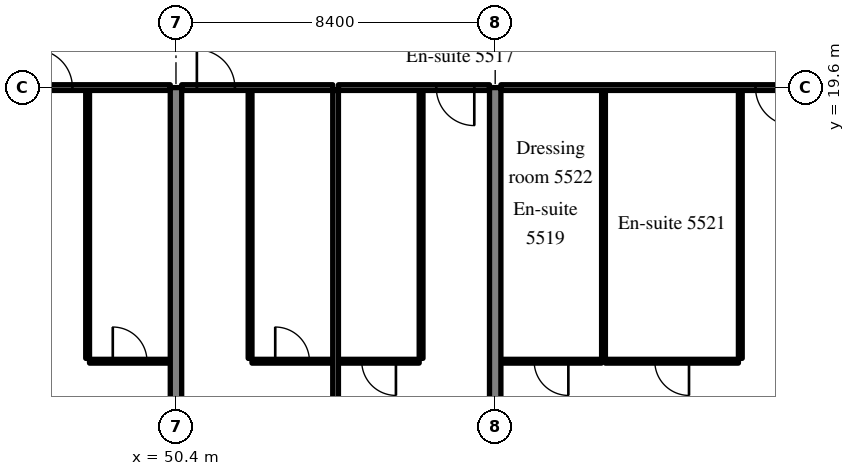
"""IFC4 building model, lengths in metres.
Left out: names, types, materials, properties, quantities, classifications, styles, units other than length and angle.
Written with IfcOpenShell. Run it as: python <this file> out.ifc"""

import sys

from ifc_helpers import new_model, si_unit, direction, frame, frame_2d, origin, place, context, subcontext, project, spatial, rectangle, extrude, source, transform, mapped, element, fill, save


model = new_model("IFC4")
c1 = context("Model", 3, precision=1e-05, world=origin(), true_north=direction((0.0, 1.0)))
c2 = subcontext(c1, "Body", "Model", "MODEL_VIEW")
j1 = project(units=[si_unit("LENGTHUNIT", "METRE"), si_unit("PLANEANGLEUNIT", "RADIAN")], contexts=[c1])
p1 = place(None, origin())
s1 = spatial("IfcSite", under=j1, at=p1, CompositionType="ELEMENT")
p2 = place(p1, origin())
s2 = spatial("IfcBuilding", under=s1, at=p2, CompositionType="ELEMENT")
p3 = place(p2, frame((0.0, 0.0, 229.6)))
s3 = spatial("IfcBuildingStorey", under=s2, at=p3, CompositionType="ELEMENT", Elevation=229.6)
m1 = source(origin(), c2, "Body", "SweptSolid", [
    extrude(rectangle(XDim=13.1, YDim=0.3, at=frame_2d((6.55, 0.0))), origin(), (0.0, 0.0, 1.0), 3.62),
])
p4 = place(p3, frame((50.4, 6.5, 0.0), z_axis=(0.0, 0.0, 1.0), x_axis=(0.0, 1.0, 0.0)))
e1 = element("IfcWall", 1, at=p4, inside=s3, PredefinedType="SHEAR", context=c2, shape_type="MappedRepresentation", body=[
    mapped(m1, transform((0.0, 0.0, 0.0), scale=1.0)),
])
m2 = source(origin(), c2, "Body", "SweptSolid", [
    extrude(rectangle(XDim=14.1, YDim=0.3, at=frame_2d((7.05, 0.0))), origin(), (0.0, 0.0, 1.0), 3.62),
])
p5 = place(p3, frame((58.8, 5.5, 0.0), z_axis=(0.0, 0.0, 1.0), x_axis=(0.0, 1.0, 0.0)))
e2 = element("IfcWall", 2, at=p5, inside=s3, PredefinedType="SHEAR", context=c2, shape_type="MappedRepresentation", body=[
    mapped(m2, transform((0.0, 0.0, 0.0), scale=1.0)),
])
m3 = source(origin(), c2, "Body", "SweptSolid", [
    extrude(rectangle(XDim=7.05, YDim=0.1, at=frame_2d((3.525, 0.0))), origin(), (0.0, 0.0, 1.0), 3.62),
])
p6 = place(p3, frame((48.075, 12.475, 0.0), z_axis=(0.0, 0.0, 1.0), x_axis=(0.0, 1.0, 0.0)))
e3 = element("IfcWall", 3, at=p6, inside=s3, PredefinedType="PARTITIONING", context=c2, shape_type="MappedRepresentation", body=[
    mapped(m3, transform((0.0, 0.0, 0.0), scale=1.0)),
])
m4 = source(origin(), c2, "Body", "SweptSolid", [
    extrude(rectangle(XDim=2.125, YDim=0.1, at=frame_2d((1.062, 0.0))), origin(), (0.0, 0.0, 1.0), 3.62),
])
p7 = place(p3, frame((48.125, 12.4, 0.0), z_axis=(0.0, 0.0, 1.0), x_axis=(1.0, 0.0, 0.0)))
e4 = element("IfcWall", 4, at=p7, inside=s3, PredefinedType="PARTITIONING", context=c2, shape_type="MappedRepresentation", body=[
    mapped(m4, transform((0.0, 0.0, 0.0), scale=1.0)),
])
m5 = source(origin(), c2, "Body", "SweptSolid", [
    extrude(rectangle(XDim=0.9, YDim=2.1, at=frame_2d((0.45, 1.05))), frame((0.0, 0.06, 0.0), z_axis=(0.0, -1.0, 0.0), x_axis=(1.0, 0.0, 0.0)), (0.0, 0.0, 1.0), 0.12),
])
p8 = place(p7, frame((0.612, 0.0, 0.0)))
e5 = element("IfcOpeningElement", 5, at=p8, cuts=e4, PredefinedType="OPENING", context=c2, shape_type="MappedRepresentation", body=[
    mapped(m5, transform((0.0, 0.0, 0.0), scale=1.0)),
])
m6 = source(origin(), c2, "Body", "SweptSolid", [
    extrude(rectangle(XDim=3.975, YDim=0.15, at=frame_2d((1.988, 0.0))), origin(), (0.0, 0.0, 1.0), 2.92),
])
p9 = place(p3, frame((46.275, 19.6, 0.0), z_axis=(0.0, 0.0, 1.0), x_axis=(1.0, 0.0, 0.0)))
e6 = element("IfcWall", 6, at=p9, inside=s3, PredefinedType="PARTITIONING", context=c2, shape_type="MappedRepresentation", body=[
    mapped(m6, transform((0.0, 0.0, 0.0), scale=1.0)),
])
m7 = source(origin(), c2, "Body", "SweptSolid", [
    extrude(rectangle(XDim=1.0, YDim=2.1, at=frame_2d((0.5, 1.05))), frame((0.0, 0.085, 0.0), z_axis=(0.0, -1.0, 0.0), x_axis=(1.0, 0.0, 0.0)), (0.0, 0.0, 1.0), 0.17),
])
p10 = place(p9, frame((0.4, 0.0, 0.0)))
e7 = element("IfcOpeningElement", 7, at=p10, cuts=e6, PredefinedType="OPENING", context=c2, shape_type="MappedRepresentation", body=[
    mapped(m7, transform((0.0, 0.0, 0.0), scale=1.0)),
])
p11 = place(p3, frame((52.35, 12.475, 0.0), z_axis=(0.0, 0.0, 1.0), x_axis=(0.0, 1.0, 0.0)))
e8 = element("IfcWall", 8, at=p11, inside=s3, PredefinedType="PARTITIONING", context=c2, shape_type="MappedRepresentation", body=[
    mapped(m3, transform((0.0, 0.0, 0.0), scale=1.0)),
])
p12 = place(p3, frame((52.4, 12.4, 0.0), z_axis=(0.0, 0.0, 1.0), x_axis=(1.0, 0.0, 0.0)))
e9 = element("IfcWall", 9, at=p12, inside=s3, PredefinedType="PARTITIONING", context=c2, shape_type="MappedRepresentation", body=[
    mapped(m4, transform((0.0, 0.0, 0.0), scale=1.0)),
])
p13 = place(p12, frame((0.612, 0.0, 0.0)))
e10 = element("IfcOpeningElement", 10, at=p13, cuts=e9, PredefinedType="OPENING", context=c2, shape_type="MappedRepresentation", body=[
    mapped(m5, transform((0.0, 0.0, 0.0), scale=1.0)),
])
m8 = source(origin(), c2, "Body", "SweptSolid", [
    extrude(rectangle(XDim=3.975, YDim=0.15, at=frame_2d((1.987, 0.0))), origin(), (0.0, 0.0, 1.0), 2.92),
])
p14 = place(p3, frame((50.55, 19.6, 0.0), z_axis=(0.0, 0.0, 1.0), x_axis=(1.0, 0.0, 0.0)))
e11 = element("IfcWall", 11, at=p14, inside=s3, PredefinedType="PARTITIONING", context=c2, shape_type="MappedRepresentation", body=[
    mapped(m8, transform((0.0, 0.0, 0.0), scale=1.0)),
])
p15 = place(p14, frame((0.4, 0.0, 0.0)))
e12 = element("IfcOpeningElement", 12, at=p15, cuts=e11, PredefinedType="OPENING", context=c2, shape_type="MappedRepresentation", body=[
    mapped(m7, transform((0.0, 0.0, 0.0), scale=1.0)),
])
p16 = place(p3, frame((56.85, 12.475, 0.0), z_axis=(0.0, 0.0, 1.0), x_axis=(0.0, 1.0, 0.0)))
e13 = element("IfcWall", 13, at=p16, inside=s3, PredefinedType="PARTITIONING", context=c2, shape_type="MappedRepresentation", body=[
    mapped(m3, transform((0.0, 0.0, 0.0), scale=1.0)),
])
p17 = place(p3, frame((54.675, 12.4, 0.0), z_axis=(0.0, 0.0, 1.0), x_axis=(1.0, 0.0, 0.0)))
e14 = element("IfcWall", 14, at=p17, inside=s3, PredefinedType="PARTITIONING", context=c2, shape_type="MappedRepresentation", body=[
    mapped(m4, transform((0.0, 0.0, 0.0), scale=1.0)),
])
p18 = place(p17, frame((0.613, 0.0, 0.0)))
e15 = element("IfcOpeningElement", 15, at=p18, cuts=e14, PredefinedType="OPENING", context=c2, shape_type="MappedRepresentation", body=[
    mapped(m5, transform((0.0, 0.0, 0.0), scale=1.0)),
])
p19 = place(p3, frame((54.675, 19.6, 0.0), z_axis=(0.0, 0.0, 1.0), x_axis=(1.0, 0.0, 0.0)))
e16 = element("IfcWall", 16, at=p19, inside=s3, PredefinedType="PARTITIONING", context=c2, shape_type="MappedRepresentation", body=[
    mapped(m8, transform((0.0, 0.0, 0.0), scale=1.0)),
])
p20 = place(p19, frame((2.575, 0.0, 0.0)))
e17 = element("IfcOpeningElement", 17, at=p20, cuts=e16, PredefinedType="OPENING", context=c2, shape_type="MappedRepresentation", body=[
    mapped(m7, transform((0.0, 0.0, 0.0), scale=1.0)),
])
m9 = source(origin(), c2, "Body", "SweptSolid", [
    extrude(rectangle(XDim=14.906, YDim=0.15, at=frame_2d((7.453, 0.0))), origin(), (0.0, 0.0, 1.0), 3.62),
])
p21 = place(p3, frame((54.6, 4.619, 0.0), z_axis=(0.0, 0.0, 1.0), x_axis=(0.0, 1.0, 0.0)))
e18 = element("IfcWall", 18, at=p21, inside=s3, PredefinedType="PARTITIONING", context=c2, shape_type="MappedRepresentation", body=[
    mapped(m9, transform((0.0, 0.0, 0.0), scale=1.0)),
])
for number, where, z_axis, x_axis in (
    (19, (65.25, 12.475, 0.0), (0.0, 0.0, 1.0), (0.0, 1.0, 0.0)),
    (20, (61.65, 12.475, 0.0), (0.0, 0.0, 1.0), (0.0, 1.0, 0.0)),
):
    element("IfcWall", number, at=place(p3, frame(where, z_axis=z_axis, x_axis=x_axis)), inside=s3, PredefinedType="PARTITIONING", context=c2, shape_type="MappedRepresentation", body=[
        mapped(m3, transform((0.0, 0.0, 0.0), scale=1.0)),
    ])
m10 = source(origin(), c2, "Body", "SweptSolid", [
    extrude(rectangle(XDim=3.5, YDim=0.1, at=frame_2d((1.75, 0.0))), origin(), (0.0, 0.0, 1.0), 3.62),
])
p22 = place(p3, frame((61.7, 12.4, 0.0), z_axis=(0.0, 0.0, 1.0), x_axis=(1.0, 0.0, 0.0)))
e21 = element("IfcWall", 21, at=p22, inside=s3, PredefinedType="PARTITIONING", context=c2, shape_type="MappedRepresentation", body=[
    mapped(m10, transform((0.0, 0.0, 0.0), scale=1.0)),
])
p23 = place(p22, frame((1.3, 0.0, 0.0)))
e22 = element("IfcOpeningElement", 22, at=p23, cuts=e21, PredefinedType="OPENING", context=c2, shape_type="MappedRepresentation", body=[
    mapped(m5, transform((0.0, 0.0, 0.0), scale=1.0)),
])
m11 = source(origin(), c2, "Body", "SweptSolid", [
    extrude(rectangle(XDim=2.65, YDim=0.1, at=frame_2d((1.325, 0.0))), origin(), (0.0, 0.0, 1.0), 3.62),
])
p24 = place(p3, frame((58.95, 12.4, 0.0), z_axis=(0.0, 0.0, 1.0), x_axis=(1.0, 0.0, 0.0)))
e23 = element("IfcWall", 23, at=p24, inside=s3, PredefinedType="PARTITIONING", context=c2, shape_type="MappedRepresentation", body=[
    mapped(m11, transform((0.0, 0.0, 0.0), scale=1.0)),
])
p25 = place(p24, frame((0.875, 0.0, 0.0)))
e24 = element("IfcOpeningElement", 24, at=p25, cuts=e23, PredefinedType="OPENING", context=c2, shape_type="MappedRepresentation", body=[
    mapped(m5, transform((0.0, 0.0, 0.0), scale=1.0)),
])
m12 = source(origin(), c2, "Body", "SweptSolid", [
    extrude(rectangle(XDim=8.1, YDim=0.15, at=frame_2d((4.05, 0.0))), origin(), (0.0, 0.0, 1.0), 2.92),
])
p26 = place(p3, frame((58.95, 19.6, 0.0), z_axis=(0.0, 0.0, 1.0), x_axis=(1.0, 0.0, 0.0)))
e25 = element("IfcWall", 25, at=p26, inside=s3, PredefinedType="PARTITIONING", context=c2, shape_type="MappedRepresentation", body=[
    mapped(m12, transform((0.0, 0.0, 0.0), scale=1.0)),
])
p27 = place(p26, frame((6.7, 0.0, 0.0)))
e26 = element("IfcOpeningElement", 26, at=p27, cuts=e25, PredefinedType="OPENING", context=c2, shape_type="MappedRepresentation", body=[
    mapped(m7, transform((0.0, 0.0, 0.0), scale=1.0)),
])
m13 = source(origin(), c2, "Body", "SweptSolid", [
    extrude(rectangle(XDim=0.9, YDim=2.1, at=frame_2d((0.45, 1.05))), frame((0.0, 0.025, 0.0), z_axis=(0.0, -1.0, 0.0), x_axis=(1.0, 0.0, 0.0)), (0.0, 0.0, 1.0), 0.05),
])
p28 = place(p8, origin())
e27 = element("IfcDoor", 27, at=p28, inside=s3, OperationType="SINGLE_SWING_LEFT", PredefinedType="DOOR", context=c2, shape_type="MappedRepresentation", body=[
    mapped(m13, transform((0.0, 0.0, 0.0), scale=1.0)),
])
fill(e5, e27)
m14 = source(origin(), c2, "Body", "SweptSolid", [
    extrude(rectangle(XDim=1.0, YDim=2.1, at=frame_2d((0.5, 1.05))), frame((0.0, 0.025, 0.0), z_axis=(0.0, -1.0, 0.0), x_axis=(1.0, 0.0, 0.0)), (0.0, 0.0, 1.0), 0.05),
])
p29 = place(p10, origin())
e28 = element("IfcDoor", 28, at=p29, inside=s3, OperationType="SINGLE_SWING_LEFT", PredefinedType="DOOR", context=c2, shape_type="MappedRepresentation", body=[
    mapped(m14, transform((0.0, 0.0, 0.0), scale=1.0)),
])
fill(e7, e28)
p30 = place(p13, origin())
e29 = element("IfcDoor", 29, at=p30, inside=s3, OperationType="SINGLE_SWING_LEFT", PredefinedType="DOOR", context=c2, shape_type="MappedRepresentation", body=[
    mapped(m13, transform((0.0, 0.0, 0.0), scale=1.0)),
])
fill(e10, e29)
p31 = place(p15, origin())
e30 = element("IfcDoor", 30, at=p31, inside=s3, OperationType="SINGLE_SWING_LEFT", PredefinedType="DOOR", context=c2, shape_type="MappedRepresentation", body=[
    mapped(m14, transform((0.0, 0.0, 0.0), scale=1.0)),
])
fill(e12, e30)
p32 = place(p18, origin())
e31 = element("IfcDoor", 31, at=p32, inside=s3, OperationType="SINGLE_SWING_RIGHT", PredefinedType="DOOR", context=c2, shape_type="MappedRepresentation", body=[
    mapped(m13, transform((0.0, 0.0, 0.0), scale=1.0)),
])
fill(e15, e31)
p33 = place(p20, origin())
e32 = element("IfcDoor", 32, at=p33, inside=s3, OperationType="SINGLE_SWING_RIGHT", PredefinedType="DOOR", context=c2, shape_type="MappedRepresentation", body=[
    mapped(m14, transform((0.0, 0.0, 0.0), scale=1.0)),
])
fill(e17, e32)
p34 = place(p23, origin())
e33 = element("IfcDoor", 33, at=p34, inside=s3, OperationType="SINGLE_SWING_RIGHT", PredefinedType="DOOR", context=c2, shape_type="MappedRepresentation", body=[
    mapped(m13, transform((0.0, 0.0, 0.0), scale=1.0)),
])
fill(e22, e33)
p35 = place(p25, origin())
e34 = element("IfcDoor", 34, at=p35, inside=s3, OperationType="SINGLE_SWING_RIGHT", PredefinedType="DOOR", context=c2, shape_type="MappedRepresentation", body=[
    mapped(m13, transform((0.0, 0.0, 0.0), scale=1.0)),
])
fill(e24, e34)
p36 = place(p27, origin())
e35 = element("IfcDoor", 35, at=p36, inside=s3, OperationType="SINGLE_SWING_RIGHT", PredefinedType="DOOR", context=c2, shape_type="MappedRepresentation", body=[
    mapped(m14, transform((0.0, 0.0, 0.0), scale=1.0)),
])
fill(e26, e35)
save(model, sys.argv[1])
